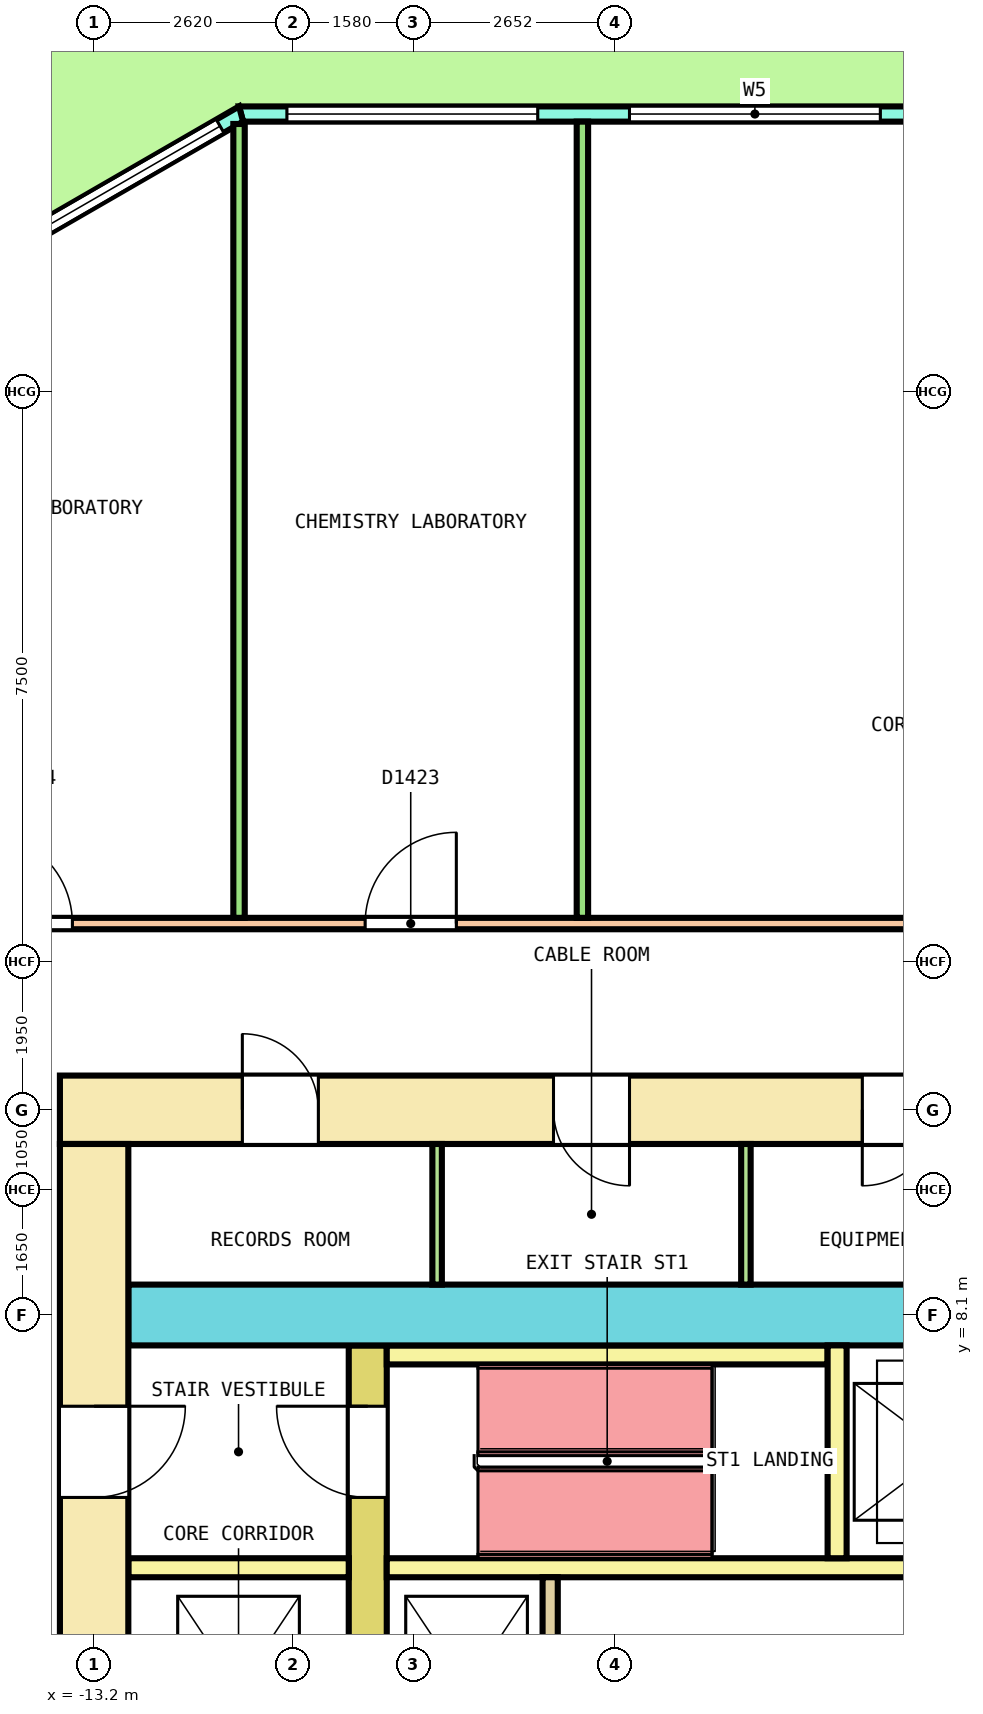
"""IFC4 building model, lengths in metres.
Left out: names, types, materials, properties, quantities, classifications, styles, units other than length and angle.
Written with IfcOpenShell. Run it as: python <this file> out.ifc"""

import sys

from ifc_helpers import new_model, si_unit, direction, frame, frame_2d, origin, place, context, subcontext, project, spatial, polyline, rectangle, outline, extrude, element, fill, save


model = new_model("IFC4")
c1 = context("Model", 3, precision=1e-05, world=origin(), true_north=direction((0.0, 1.0)))
c2 = subcontext(c1, "Body", "Model", "MODEL_VIEW")
j1 = project(units=[si_unit("LENGTHUNIT", "METRE"), si_unit("PLANEANGLEUNIT", "RADIAN")], contexts=[c1])
p1 = place(None, origin())
s1 = spatial("IfcSite", under=j1, at=p1, CompositionType="ELEMENT")
p2 = place(p1, origin())
s2 = spatial("IfcBuilding", under=s1, at=p2, CompositionType="ELEMENT")
p3 = place(p2, frame((0.0, 0.0, 54.2)))
s3 = spatial("IfcBuildingStorey", under=s2, at=p3, CompositionType="ELEMENT", Elevation=54.2)
p4 = place(p3, frame((11.267, 23.9, 0.0), z_axis=(0.0, 0.0, 1.0), x_axis=(-1.0, 0.0, 0.0)))
e1 = element("IfcWall", 1, at=p4, inside=s3, PredefinedType="SOLIDWALL", context=c2, shape_type="SweptSolid", body=[
    extrude(outline(polyline([(-0.027, -0.1), (1.0, -0.1), (2.027, -0.1), (3.053, -0.1), (4.08, -0.1), (5.106, -0.1), (6.133, -0.1), (7.16, -0.1), (8.187, -0.1), (9.213, -0.1), (10.24, -0.1), (11.267, -0.1), (12.293, -0.1), (13.32, -0.1), (14.347, -0.1), (15.373, -0.1), (16.4, -0.1), (17.427, -0.1), (18.453, -0.1), (19.48, -0.1), (20.507, -0.1), (21.533, -0.1), (22.56, -0.1), (22.506, 0.1), (21.485, 0.1), (20.463, 0.1), (19.441, 0.1), (18.419, 0.1), (17.397, 0.1), (16.375, 0.1), (15.354, 0.1), (14.332, 0.1), (13.31, 0.1), (12.288, 0.1), (11.267, 0.1), (10.245, 0.1), (9.223, 0.1), (8.201, 0.1), (7.179, 0.1), (6.158, 0.1), (5.136, 0.1), (4.114, 0.1), (3.092, 0.1), (2.071, 0.1), (1.049, 0.1), (0.027, 0.1), (-0.027, -0.1)])), origin(), (0.0, 0.0, 1.0), 4.1),
])
p5 = place(p4, frame((0.603, 0.0, 0.1)))
e2 = element("IfcOpeningElement", 2, at=p5, cuts=e1, PredefinedType="OPENING", context=c2, shape_type="SweptSolid", body=[
    extrude(rectangle(XDim=3.3, YDim=2.9, at=frame_2d((1.65, 1.45))), frame((0.0, 0.11, 0.0), z_axis=(0.0, -1.0, 0.0), x_axis=(1.0, 0.0, 0.0)), (0.0, 0.0, 1.0), 0.22),
])
p6 = place(p4, frame((5.11, 0.0, 0.1)))
e3 = element("IfcOpeningElement", 3, at=p6, cuts=e1, PredefinedType="OPENING", context=c2, shape_type="SweptSolid", body=[
    extrude(rectangle(XDim=3.3, YDim=2.9, at=frame_2d((1.65, 1.45))), frame((0.0, 0.11, 0.0), z_axis=(0.0, -1.0, 0.0), x_axis=(1.0, 0.0, 0.0)), (0.0, 0.0, 1.0), 0.22),
])
p7 = place(p4, frame((10.367, 0.0, 0.0)))
e4 = element("IfcOpeningElement", 4, at=p7, cuts=e1, PredefinedType="OPENING", context=c2, shape_type="SweptSolid", body=[
    extrude(rectangle(XDim=1.8, YDim=2.4, at=frame_2d((0.9, 1.2))), frame((0.0, 0.11, 0.0), z_axis=(0.0, -1.0, 0.0), x_axis=(1.0, 0.0, 0.0)), (0.0, 0.0, 1.0), 0.22),
])
p8 = place(p4, frame((10.367, 0.0, 2.55)))
e5 = element("IfcOpeningElement", 5, at=p8, cuts=e1, PredefinedType="OPENING", context=c2, shape_type="SweptSolid", body=[
    extrude(rectangle(XDim=1.8, YDim=0.45, at=frame_2d((0.9, 0.225))), frame((0.0, 0.11, 0.0), z_axis=(0.0, -1.0, 0.0), x_axis=(1.0, 0.0, 0.0)), (0.0, 0.0, 1.0), 0.22),
])
p9 = place(p4, frame((14.123, 0.0, 0.1)))
e6 = element("IfcOpeningElement", 6, at=p9, cuts=e1, PredefinedType="OPENING", context=c2, shape_type="SweptSolid", body=[
    extrude(rectangle(XDim=3.3, YDim=2.9, at=frame_2d((1.65, 1.45))), frame((0.0, 0.11, 0.0), z_axis=(0.0, -1.0, 0.0), x_axis=(1.0, 0.0, 0.0)), (0.0, 0.0, 1.0), 0.22),
])
p10 = place(p4, frame((18.63, 0.0, 0.1)))
e7 = element("IfcOpeningElement", 7, at=p10, cuts=e1, PredefinedType="OPENING", context=c2, shape_type="SweptSolid", body=[
    extrude(rectangle(XDim=3.3, YDim=2.9, at=frame_2d((1.65, 1.45))), frame((0.0, 0.11, 0.0), z_axis=(0.0, -1.0, 0.0), x_axis=(1.0, 0.0, 0.0)), (0.0, 0.0, 1.0), 0.22),
])
p11 = place(p3, frame((-11.267, 23.9, 0.0), z_axis=(0.0, 0.0, 1.0), x_axis=(-0.866029458321, -0.49999297727, 0.0)))
e8 = element("IfcWall", 8, at=p11, inside=s3, PredefinedType="SOLIDWALL", context=c2, shape_type="SweptSolid", body=[
    extrude(outline(polyline([(-0.027, -0.1), (1.128, -0.1), (2.282, -0.1), (3.437, -0.1), (4.592, -0.1), (5.747, -0.1), (6.901, -0.1), (6.848, 0.1), (5.711, 0.1), (4.574, 0.1), (3.437, 0.1), (2.301, 0.1), (1.164, 0.1), (0.027, 0.1), (-0.027, -0.1)])), origin(), (0.0, 0.0, 1.0), 4.1),
])
p12 = place(p11, frame((0.319, 0.0, 0.1)))
e9 = element("IfcOpeningElement", 9, at=p12, cuts=e8, PredefinedType="OPENING", context=c2, shape_type="SweptSolid", body=[
    extrude(rectangle(XDim=2.8, YDim=2.9, at=frame_2d((1.4, 1.45))), frame((0.0, 0.11, 0.0), z_axis=(0.0, -1.0, 0.0), x_axis=(1.0, 0.0, 0.0)), (0.0, 0.0, 1.0), 0.22),
])
p13 = place(p11, frame((3.756, 0.0, 0.1)))
e10 = element("IfcOpeningElement", 10, at=p13, cuts=e8, PredefinedType="OPENING", context=c2, shape_type="SweptSolid", body=[
    extrude(rectangle(XDim=2.8, YDim=2.9, at=frame_2d((1.4, 1.45))), frame((0.0, 0.11, 0.0), z_axis=(0.0, -1.0, 0.0), x_axis=(1.0, 0.0, 0.0)), (0.0, 0.0, 1.0), 0.22),
])
p14 = place(p3, frame((-13.65, 10.8, 0.0), z_axis=(0.0, 0.0, 1.0), x_axis=(1.0, 0.0, 0.0)))
e11 = element("IfcWall", 11, at=p14, inside=s3, PredefinedType="SHEAR", context=c2, shape_type="SweptSolid", body=[
    extrude(rectangle(XDim=27.3, YDim=0.9, at=frame_2d((13.65, 0.0))), origin(), (0.0, 0.0, 1.0), 4.1),
])
p15 = place(p14, frame((2.4, 0.0, 0.0)))
e12 = element("IfcOpeningElement", 12, at=p15, cuts=e11, PredefinedType="OPENING", context=c2, shape_type="SweptSolid", body=[
    extrude(rectangle(XDim=1.0, YDim=2.1, at=frame_2d((0.5, 1.05))), frame((0.0, 0.46, 0.0), z_axis=(0.0, -1.0, 0.0), x_axis=(1.0, 0.0, 0.0)), (0.0, 0.0, 1.0), 0.92),
])
p16 = place(p14, frame((6.494, 0.0, 0.0)))
e13 = element("IfcOpeningElement", 13, at=p16, cuts=e11, PredefinedType="OPENING", context=c2, shape_type="SweptSolid", body=[
    extrude(rectangle(XDim=1.0, YDim=2.1, at=frame_2d((0.5, 1.05))), frame((0.0, 0.46, 0.0), z_axis=(0.0, -1.0, 0.0), x_axis=(1.0, 0.0, 0.0)), (0.0, 0.0, 1.0), 0.92),
])
p17 = place(p14, frame((10.556, 0.0, 0.0)))
e14 = element("IfcOpeningElement", 14, at=p17, cuts=e11, PredefinedType="OPENING", context=c2, shape_type="SweptSolid", body=[
    extrude(rectangle(XDim=1.0, YDim=2.1, at=frame_2d((0.5, 1.05))), frame((0.0, 0.46, 0.0), z_axis=(0.0, -1.0, 0.0), x_axis=(1.0, 0.0, 0.0)), (0.0, 0.0, 1.0), 0.92),
])
p18 = place(p14, frame((18.077, 0.0, 0.0)))
e15 = element("IfcOpeningElement", 15, at=p18, cuts=e11, PredefinedType="OPENING", context=c2, shape_type="SweptSolid", body=[
    extrude(rectangle(XDim=1.0, YDim=2.1, at=frame_2d((0.5, 1.05))), frame((0.0, 0.46, 0.0), z_axis=(0.0, -1.0, 0.0), x_axis=(1.0, 0.0, 0.0)), (0.0, 0.0, 1.0), 0.92),
])
p19 = place(p14, frame((21.206, 0.0, 0.0)))
e16 = element("IfcOpeningElement", 16, at=p19, cuts=e11, PredefinedType="OPENING", context=c2, shape_type="SweptSolid", body=[
    extrude(rectangle(XDim=1.0, YDim=2.1, at=frame_2d((0.5, 1.05))), frame((0.0, 0.46, 0.0), z_axis=(0.0, -1.0, 0.0), x_axis=(1.0, 0.0, 0.0)), (0.0, 0.0, 1.0), 0.92),
])
p20 = place(p14, frame((24.367, 0.0, 0.0)))
e17 = element("IfcOpeningElement", 17, at=p20, cuts=e11, PredefinedType="OPENING", context=c2, shape_type="SweptSolid", body=[
    extrude(rectangle(XDim=1.0, YDim=2.1, at=frame_2d((0.5, 1.05))), frame((0.0, 0.46, 0.0), z_axis=(0.0, -1.0, 0.0), x_axis=(1.0, 0.0, 0.0)), (0.0, 0.0, 1.0), 0.92),
])
p21 = place(p14, frame((14.575, 0.0, 0.0)))
e18 = element("IfcOpeningElement", 18, at=p21, cuts=e11, PredefinedType="OPENING", context=c2, shape_type="SweptSolid", body=[
    extrude(rectangle(XDim=1.4, YDim=2.1, at=frame_2d((0.7, 1.05))), frame((0.0, 0.46, 0.0), z_axis=(0.0, -1.0, 0.0), x_axis=(1.0, 0.0, 0.0)), (0.0, 0.0, 1.0), 0.92),
])
p22 = place(p3, frame((-13.2, -10.35, 0.0), z_axis=(0.0, 0.0, 1.0), x_axis=(0.0, 1.0, 0.0)))
e19 = element("IfcWall", 19, at=p22, inside=s3, PredefinedType="SHEAR", context=c2, shape_type="SweptSolid", body=[
    extrude(rectangle(XDim=20.7, YDim=0.9, at=frame_2d((10.35, 0.0))), origin(), (0.0, 0.0, 1.0), 4.1),
])
p23 = place(p22, frame((9.15, 0.0, 0.0)))
e20 = element("IfcOpeningElement", 20, at=p23, cuts=e19, PredefinedType="OPENING", context=c2, shape_type="SweptSolid", body=[
    extrude(rectangle(XDim=2.4, YDim=2.1, at=frame_2d((1.2, 1.05))), frame((0.0, 0.46, 0.0), z_axis=(0.0, -1.0, 0.0), x_axis=(1.0, 0.0, 0.0)), (0.0, 0.0, 1.0), 0.92),
])
p24 = place(p22, frame((16.05, 0.0, 0.0)))
e21 = element("IfcOpeningElement", 21, at=p24, cuts=e19, PredefinedType="OPENING", context=c2, shape_type="SweptSolid", body=[
    extrude(rectangle(XDim=1.2, YDim=2.1, at=frame_2d((0.6, 1.05))), frame((0.0, 0.46, 0.0), z_axis=(0.0, -1.0, 0.0), x_axis=(1.0, 0.0, 0.0)), (0.0, 0.0, 1.0), 0.92),
])
p25 = place(p22, frame((3.45, 0.0, 0.0)))
e22 = element("IfcOpeningElement", 22, at=p25, cuts=e19, PredefinedType="OPENING", context=c2, shape_type="SweptSolid", body=[
    extrude(rectangle(XDim=1.2, YDim=2.1, at=frame_2d((0.6, 1.05))), frame((0.0, 0.46, 0.0), z_axis=(0.0, -1.0, 0.0), x_axis=(1.0, 0.0, 0.0)), (0.0, 0.0, 1.0), 0.92),
])
p26 = place(p3, frame((-12.75, 8.1, 0.0), z_axis=(0.0, 0.0, 1.0), x_axis=(1.0, 0.0, 0.0)))
e23 = element("IfcWall", 23, at=p26, inside=s3, PredefinedType="SHEAR", context=c2, shape_type="SweptSolid", body=[
    extrude(rectangle(XDim=25.5, YDim=0.8, at=frame_2d((12.75, 0.0))), origin(), (0.0, 0.0, 1.0), 4.1),
])
p27 = place(p26, frame((13.675, 0.0, 0.0)))
e24 = element("IfcOpeningElement", 24, at=p27, cuts=e23, PredefinedType="OPENING", context=c2, shape_type="SweptSolid", body=[
    extrude(rectangle(XDim=1.4, YDim=2.1, at=frame_2d((0.7, 1.05))), frame((0.0, 0.41, 0.0), z_axis=(0.0, -1.0, 0.0), x_axis=(1.0, 0.0, 0.0)), (0.0, 0.0, 1.0), 0.82),
])
p28 = place(p3, frame((-9.6, -7.7, 0.0), z_axis=(0.0, 0.0, 1.0), x_axis=(0.0, 1.0, 0.0)))
e25 = element("IfcWall", 25, at=p28, inside=s3, PredefinedType="SHEAR", context=c2, shape_type="SweptSolid", body=[
    extrude(rectangle(XDim=15.4, YDim=0.5, at=frame_2d((7.7, 0.0))), origin(), (0.0, 0.0, 1.0), 4.1),
])
p29 = place(p28, frame((6.5, 0.0, 0.0)))
e26 = element("IfcOpeningElement", 26, at=p29, cuts=e25, PredefinedType="OPENING", context=c2, shape_type="SweptSolid", body=[
    extrude(rectangle(XDim=2.4, YDim=2.1, at=frame_2d((1.2, 1.05))), frame((0.0, 0.26, 0.0), z_axis=(0.0, -1.0, 0.0), x_axis=(1.0, 0.0, 0.0)), (0.0, 0.0, 1.0), 0.52),
])
p30 = place(p28, frame((13.4, 0.0, 0.0)))
e27 = element("IfcOpeningElement", 27, at=p30, cuts=e25, PredefinedType="OPENING", context=c2, shape_type="SweptSolid", body=[
    extrude(rectangle(XDim=1.2, YDim=2.1, at=frame_2d((0.6, 1.05))), frame((0.0, 0.26, 0.0), z_axis=(0.0, -1.0, 0.0), x_axis=(1.0, 0.0, 0.0)), (0.0, 0.0, 1.0), 0.52),
])
p31 = place(p28, frame((0.8, 0.0, 0.0)))
e28 = element("IfcOpeningElement", 28, at=p31, cuts=e25, PredefinedType="OPENING", context=c2, shape_type="SweptSolid", body=[
    extrude(rectangle(XDim=1.2, YDim=2.1, at=frame_2d((0.6, 1.05))), frame((0.0, 0.26, 0.0), z_axis=(0.0, -1.0, 0.0), x_axis=(1.0, 0.0, 0.0)), (0.0, 0.0, 1.0), 0.52),
])
p32 = place(p3, frame((-12.75, 4.775, 0.0), z_axis=(0.0, 0.0, 1.0), x_axis=(1.0, 0.0, 0.0)))
e29 = element("IfcWall", 29, at=p32, inside=s3, PredefinedType="SOLIDWALL", context=c2, shape_type="SweptSolid", body=[
    extrude(rectangle(XDim=2.9, YDim=0.25, at=frame_2d((1.45, 0.0))), origin(), (0.0, 0.0, 1.0), 4.1),
])
p33 = place(p3, frame((-9.35, 4.775, 0.0), z_axis=(0.0, 0.0, 1.0), x_axis=(1.0, 0.0, 0.0)))
e30 = element("IfcWall", 30, at=p33, inside=s3, PredefinedType="SOLIDWALL", context=c2, shape_type="SweptSolid", body=[
    extrude(rectangle(XDim=18.7, YDim=0.25, at=frame_2d((9.35, 0.0))), origin(), (0.0, 0.0, 1.0), 4.1),
])
p34 = place(p3, frame((-7.2, 1.75, 0.0), z_axis=(0.0, 0.0, 1.0), x_axis=(0.0, 1.0, 0.0)))
e31 = element("IfcWall", 31, at=p34, inside=s3, PredefinedType="SOLIDWALL", context=c2, shape_type="SweptSolid", body=[
    extrude(rectangle(XDim=2.9, YDim=0.2, at=frame_2d((1.45, 0.0))), origin(), (0.0, 0.0, 1.0), 4.1),
])
p35 = place(p3, frame((-9.35, 7.575, 0.0), z_axis=(0.0, 0.0, 1.0), x_axis=(1.0, 0.0, 0.0)))
e32 = element("IfcWall", 32, at=p35, inside=s3, PredefinedType="SOLIDWALL", context=c2, shape_type="SweptSolid", body=[
    extrude(rectangle(XDim=5.8, YDim=0.25, at=frame_2d((2.9, 0.0))), origin(), (0.0, 0.0, 1.0), 4.1),
])
p36 = place(p3, frame((-3.425, 4.9, 0.0), z_axis=(0.0, 0.0, 1.0), x_axis=(0.0, 1.0, 0.0)))
e33 = element("IfcWall", 33, at=p36, inside=s3, PredefinedType="SOLIDWALL", context=c2, shape_type="SweptSolid", body=[
    extrude(rectangle(XDim=2.8, YDim=0.25, at=frame_2d((1.4, 0.0))), origin(), (0.0, 0.0, 1.0), 4.1),
])
for number, where, z_axis, x_axis in (
    (34, (-8.688, 8.5, 0.0), (0.0, 0.0, 1.0), (0.0, 1.0, 0.0)),
    (35, (-4.625, 8.5, 0.0), (0.0, 0.0, 1.0), (0.0, 1.0, 0.0)),
):
    element("IfcWall", number, at=place(p3, frame(where, z_axis=z_axis, x_axis=x_axis)), inside=s3, PredefinedType="PARTITIONING", context=c2, shape_type="SweptSolid", body=[
        extrude(rectangle(XDim=1.85, YDim=0.125, at=frame_2d((0.925, 0.0))), origin(), (0.0, 0.0, 1.0), 4.1),
    ])
p37 = place(p3, frame((-15.575, 13.25, 0.0), z_axis=(0.0, 0.0, 1.0), x_axis=(1.0, 0.0, 0.0)))
e36 = element("IfcWall", 36, at=p37, inside=s3, PredefinedType="PARTITIONING", context=c2, shape_type="SweptSolid", body=[
    extrude(rectangle(XDim=31.175, YDim=0.15, at=frame_2d((15.587, 0.0))), origin(), (0.0, 0.0, 1.0), 3.05),
])
p38 = place(p37, frame((28.148, 0.0, 0.0)))
e37 = element("IfcOpeningElement", 37, at=p38, cuts=e36, PredefinedType="OPENING", context=c2, shape_type="SweptSolid", body=[
    extrude(rectangle(XDim=1.0, YDim=2.1, at=frame_2d((0.5, 1.05))), frame((0.0, 0.085, 0.0), z_axis=(0.0, -1.0, 0.0), x_axis=(1.0, 0.0, 0.0)), (0.0, 0.0, 1.0), 0.17),
])
p39 = place(p37, frame((14.808, 0.0, 0.0)))
e38 = element("IfcOpeningElement", 38, at=p39, cuts=e36, PredefinedType="OPENING", context=c2, shape_type="SweptSolid", body=[
    extrude(rectangle(XDim=1.2, YDim=2.1, at=frame_2d((0.6, 1.05))), frame((0.0, 0.085, 0.0), z_axis=(0.0, -1.0, 0.0), x_axis=(1.0, 0.0, 0.0)), (0.0, 0.0, 1.0), 0.17),
])
p40 = place(p37, frame((5.94, 0.0, 0.0)))
e39 = element("IfcOpeningElement", 39, at=p40, cuts=e36, PredefinedType="OPENING", context=c2, shape_type="SweptSolid", body=[
    extrude(rectangle(XDim=1.2, YDim=2.1, at=frame_2d((0.6, 1.05))), frame((0.0, 0.085, 0.0), z_axis=(0.0, -1.0, 0.0), x_axis=(1.0, 0.0, 0.0)), (0.0, 0.0, 1.0), 0.17),
])
p41 = place(p37, frame((0.889, 0.0, 0.0)))
e40 = element("IfcOpeningElement", 40, at=p41, cuts=e36, PredefinedType="OPENING", context=c2, shape_type="SweptSolid", body=[
    extrude(rectangle(XDim=1.2, YDim=2.1, at=frame_2d((0.6, 1.05))), frame((0.0, 0.085, 0.0), z_axis=(0.0, -1.0, 0.0), x_axis=(1.0, 0.0, 0.0)), (0.0, 0.0, 1.0), 0.17),
])
p42 = place(p3, frame((-6.776, 13.325, 0.0), z_axis=(0.0, 0.0, 1.0), x_axis=(0.0, 1.0, 0.0)))
e41 = element("IfcWall", 41, at=p42, inside=s3, PredefinedType="PARTITIONING", context=c2, shape_type="SweptSolid", body=[
    extrude(rectangle(XDim=10.475, YDim=0.15, at=frame_2d((5.238, 0.0))), origin(), (0.0, 0.0, 1.0), 3.05),
])
p43 = place(p3, frame((-11.293, 13.325, 0.0), z_axis=(0.0, 0.0, 1.0), x_axis=(0.0, 1.0, 0.0)))
e42 = element("IfcWall", 42, at=p43, inside=s3, PredefinedType="PARTITIONING", context=c2, shape_type="SweptSolid", body=[
    extrude(rectangle(XDim=10.444, YDim=0.15, at=frame_2d((5.222, 0.0))), origin(), (0.0, 0.0, 1.0), 3.05),
])
p44 = place(p9, origin())
e43 = element("IfcWindow", 43, at=p44, inside=s3, PartitioningType="SINGLE_PANEL", PredefinedType="WINDOW", context=c2, shape_type="SweptSolid", body=[
    extrude(rectangle(XDim=3.3, YDim=2.9, at=frame_2d((1.65, 1.45))), frame((0.0, 0.03, 0.0), z_axis=(0.0, -1.0, 0.0), x_axis=(1.0, 0.0, 0.0)), (0.0, 0.0, 1.0), 0.06),
])
fill(e6, e43)
p45 = place(p10, origin())
e44 = element("IfcWindow", 44, at=p45, inside=s3, PartitioningType="SINGLE_PANEL", PredefinedType="WINDOW", context=c2, shape_type="SweptSolid", body=[
    extrude(rectangle(XDim=3.3, YDim=2.9, at=frame_2d((1.65, 1.45))), frame((0.0, 0.03, 0.0), z_axis=(0.0, -1.0, 0.0), x_axis=(1.0, 0.0, 0.0)), (0.0, 0.0, 1.0), 0.06),
])
fill(e7, e44)
p46 = place(p12, origin())
e45 = element("IfcWindow", 45, at=p46, inside=s3, PartitioningType="SINGLE_PANEL", PredefinedType="WINDOW", context=c2, shape_type="SweptSolid", body=[
    extrude(rectangle(XDim=2.8, YDim=2.9, at=frame_2d((1.4, 1.45))), frame((0.0, 0.03, 0.0), z_axis=(0.0, -1.0, 0.0), x_axis=(1.0, 0.0, 0.0)), (0.0, 0.0, 1.0), 0.06),
])
fill(e9, e45)
p47 = place(p30, origin())
e46 = element("IfcDoor", 46, at=p47, inside=s3, OperationType="SINGLE_SWING_LEFT", PredefinedType="DOOR", context=c2, shape_type="SweptSolid", body=[
    extrude(rectangle(XDim=1.2, YDim=2.1, at=frame_2d((0.6, 1.05))), frame((0.0, 0.2, 0.0), z_axis=(0.0, -1.0, 0.0), x_axis=(1.0, 0.0, 0.0)), (0.0, 0.0, 1.0), 0.4),
])
fill(e27, e46)
p48 = place(p24, origin())
e47 = element("IfcDoor", 47, at=p48, inside=s3, OperationType="SINGLE_SWING_RIGHT", PredefinedType="DOOR", context=c2, shape_type="SweptSolid", body=[
    extrude(rectangle(XDim=1.2, YDim=2.1, at=frame_2d((0.6, 1.05))), frame((0.0, 0.3, 0.0), z_axis=(0.0, -1.0, 0.0), x_axis=(1.0, 0.0, 0.0)), (0.0, 0.0, 1.0), 0.6),
])
fill(e21, e47)
p49 = place(p15, origin())
e48 = element("IfcDoor", 48, at=p49, inside=s3, OperationType="SINGLE_SWING_RIGHT", PredefinedType="DOOR", context=c2, shape_type="SweptSolid", body=[
    extrude(rectangle(XDim=1.0, YDim=2.1, at=frame_2d((0.5, 1.05))), frame((0.0, 0.3, 0.0), z_axis=(0.0, -1.0, 0.0), x_axis=(1.0, 0.0, 0.0)), (0.0, 0.0, 1.0), 0.6),
])
fill(e12, e48)
p50 = place(p16, origin())
e49 = element("IfcDoor", 49, at=p50, inside=s3, OperationType="SINGLE_SWING_LEFT", PredefinedType="DOOR", context=c2, shape_type="SweptSolid", body=[
    extrude(rectangle(XDim=1.0, YDim=2.1, at=frame_2d((0.5, 1.05))), frame((0.0, 0.3, 0.0), z_axis=(0.0, -1.0, 0.0), x_axis=(1.0, 0.0, 0.0)), (0.0, 0.0, 1.0), 0.6),
])
fill(e13, e49)
p51 = place(p17, origin())
e50 = element("IfcDoor", 50, at=p51, inside=s3, OperationType="SINGLE_SWING_RIGHT", PredefinedType="DOOR", context=c2, shape_type="SweptSolid", body=[
    extrude(rectangle(XDim=1.0, YDim=2.1, at=frame_2d((0.5, 1.05))), frame((0.0, 0.3, 0.0), z_axis=(0.0, -1.0, 0.0), x_axis=(1.0, 0.0, 0.0)), (0.0, 0.0, 1.0), 0.6),
])
fill(e14, e50)
p52 = place(p40, origin())
e51 = element("IfcDoor", 51, at=p52, inside=s3, OperationType="DOUBLE_DOOR_SINGLE_SWING", PredefinedType="DOOR", context=c2, shape_type="SweptSolid", body=[
    extrude(rectangle(XDim=1.2, YDim=2.1, at=frame_2d((0.6, 1.05))), frame((0.0, 0.025, 0.0), z_axis=(0.0, -1.0, 0.0), x_axis=(1.0, 0.0, 0.0)), (0.0, 0.0, 1.0), 0.05),
])
fill(e39, e51)
p53 = place(p41, origin())
e52 = element("IfcDoor", 52, at=p53, inside=s3, OperationType="DOUBLE_DOOR_SINGLE_SWING", PredefinedType="DOOR", context=c2, shape_type="SweptSolid", body=[
    extrude(rectangle(XDim=1.2, YDim=2.1, at=frame_2d((0.6, 1.05))), frame((0.0, 0.025, 0.0), z_axis=(0.0, -1.0, 0.0), x_axis=(1.0, 0.0, 0.0)), (0.0, 0.0, 1.0), 0.05),
])
fill(e40, e52)
save(model, sys.argv[1])
